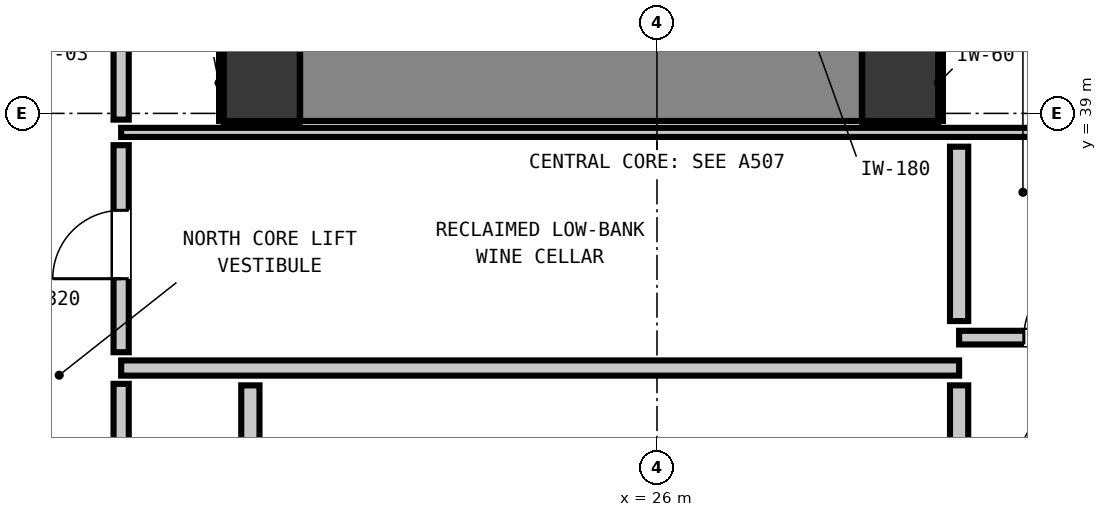
"""IFC4 building model, lengths in metres.
Left out: names, types, materials, properties, quantities, classifications, styles, units other than length and angle.
Written with IfcOpenShell. Run it as: python <this file> out.ifc"""

import sys

from ifc_helpers import new_model, si_unit, direction, frame, frame_2d, origin, origin_2d, place, context, subcontext, project, spatial, rectangle, extrude, element, fill, save


model = new_model("IFC4")
c1 = context("Model", 3, precision=1e-05, world=origin(), true_north=direction((0.0, 1.0)))
c2 = subcontext(c1, "Body", "Model", "MODEL_VIEW")
j1 = project(units=[si_unit("LENGTHUNIT", "METRE"), si_unit("PLANEANGLEUNIT", "RADIAN")], contexts=[c1])
p1 = place(None, origin())
s1 = spatial("IfcSite", under=j1, at=p1, CompositionType="ELEMENT")
p2 = place(p1, origin())
s2 = spatial("IfcBuilding", under=s1, at=p2, CompositionType="ELEMENT")
p3 = place(p2, frame((0.0, 0.0, 135.96)))
s3 = spatial("IfcBuildingStorey", under=s2, at=p3, CompositionType="ELEMENT", Elevation=135.96)
for number, where, z_axis, x_axis in (
    (1, (20.8, 39.4, 0.0), (0.0, 0.0, 1.0), (1.0, 0.0, 0.0)),
    (2, (29.2, 39.4, 0.0), (0.0, 0.0, 1.0), (1.0, 0.0, 0.0)),
):
    element("IfcColumn", number, at=place(p3, frame(where, z_axis=z_axis, x_axis=x_axis)), inside=s3, PredefinedType="COLUMN", context=c2, shape_type="SweptSolid", body=[
        extrude(rectangle(XDim=1.0, YDim=1.0, at=origin_2d()), origin(), (0.0, 0.0, 1.0), 3.32),
    ])
p4 = place(p3, frame((21.305, 39.4, 0.0), z_axis=(0.0, 0.0, 1.0), x_axis=(1.0, 0.0, 0.0)))
e3 = element("IfcWall", 3, at=p4, inside=s3, PredefinedType="SHEAR", context=c2, shape_type="SweptSolid", body=[
    extrude(rectangle(XDim=7.39, YDim=1.0, at=frame_2d((3.695, 0.0))), origin(), (0.0, 0.0, 1.0), 3.32),
])
p5 = place(p3, frame((18.95, 35.65, 0.0), z_axis=(0.0, 0.0, 1.0), x_axis=(1.0, 0.0, 0.0)))
e4 = element("IfcWall", 4, at=p5, inside=s3, PredefinedType="PARTITIONING", context=c2, shape_type="SweptSolid", body=[
    extrude(rectangle(XDim=11.025, YDim=0.2, at=frame_2d((5.513, 0.0))), origin(), (0.0, 0.0, 1.0), 3.08),
])
p6 = place(p3, frame((29.975, 36.05, 0.0), z_axis=(0.0, 0.0, 1.0), x_axis=(1.0, 0.0, 0.0)))
e5 = element("IfcWall", 5, at=p6, inside=s3, PredefinedType="PARTITIONING", context=c2, shape_type="SweptSolid", body=[
    extrude(rectangle(XDim=2.505, YDim=0.18, at=frame_2d((1.252, 0.0))), origin(), (0.0, 0.0, 1.0), 3.08),
])
p7 = place(p6, frame((0.852, 0.0, 0.0)))
e6 = element("IfcOpeningElement", 6, at=p7, cuts=e5, PredefinedType="OPENING", context=c2, shape_type="SweptSolid", body=[
    extrude(rectangle(XDim=0.9, YDim=2.1, at=frame_2d((0.45, 1.05))), frame((0.0, 0.1, 0.0), z_axis=(0.0, -1.0, 0.0), x_axis=(1.0, 0.0, 0.0)), (0.0, 0.0, 1.0), 0.2),
])
p8 = place(p3, frame((18.95, 38.75, 0.0), z_axis=(0.0, 0.0, 1.0), x_axis=(1.0, 0.0, 0.0)))
e7 = element("IfcWall", 7, at=p8, inside=s3, PredefinedType="PARTITIONING", context=c2, shape_type="SweptSolid", body=[
    extrude(rectangle(XDim=13.56, YDim=0.12, at=frame_2d((6.78, 0.0))), origin(), (0.0, 0.0, 1.0), 3.08),
])
p9 = place(p3, frame((20.65, 33.148, 0.0), z_axis=(0.0, 0.0, 1.0), x_axis=(0.0, 1.0, 0.0)))
e8 = element("IfcWall", 8, at=p9, inside=s3, PredefinedType="PARTITIONING", context=c2, shape_type="SweptSolid", body=[
    extrude(rectangle(XDim=2.274, YDim=0.24, at=frame_2d((1.137, 0.0))), origin(), (0.0, 0.0, 1.0), 2.315),
])
p10 = place(p3, frame((29.975, 34.498, 0.0), z_axis=(0.0, 0.0, 1.0), x_axis=(0.0, 1.0, 0.0)))
e9 = element("IfcWall", 9, at=p10, inside=s3, PredefinedType="PARTITIONING", context=c2, shape_type="SweptSolid", body=[
    extrude(rectangle(XDim=0.924, YDim=0.24, at=frame_2d((0.462, 0.0))), origin(), (0.0, 0.0, 1.0), 3.08),
])
p11 = place(p3, frame((29.975, 36.268, 0.0), z_axis=(0.0, 0.0, 1.0), x_axis=(0.0, 1.0, 0.0)))
e10 = element("IfcWall", 10, at=p11, inside=s3, PredefinedType="PARTITIONING", context=c2, shape_type="SweptSolid", body=[
    extrude(rectangle(XDim=2.294, YDim=0.24, at=frame_2d((1.147, 0.0))), origin(), (0.0, 0.0, 1.0), 3.08),
])
p12 = place(p3, frame((18.95, 33.128, 0.0), z_axis=(0.0, 0.0, 1.0), x_axis=(0.0, 1.0, 0.0)))
e11 = element("IfcWall", 11, at=p12, inside=s3, PredefinedType="PARTITIONING", context=c2, shape_type="SweptSolid", body=[
    extrude(rectangle(XDim=2.314, YDim=0.2, at=frame_2d((1.157, 0.0))), origin(), (0.0, 0.0, 1.0), 3.08),
])
p13 = place(p3, frame((18.95, 35.858, 0.0), z_axis=(0.0, 0.0, 1.0), x_axis=(0.0, 1.0, 0.0)))
e12 = element("IfcWall", 12, at=p13, inside=s3, PredefinedType="PARTITIONING", context=c2, shape_type="SweptSolid", body=[
    extrude(rectangle(XDim=2.724, YDim=0.2, at=frame_2d((1.362, 0.0))), origin(), (0.0, 0.0, 1.0), 3.08),
])
p14 = place(p13, frame((0.967, 0.0, 0.0)))
e13 = element("IfcOpeningElement", 13, at=p14, cuts=e12, PredefinedType="OPENING", context=c2, shape_type="SweptSolid", body=[
    extrude(rectangle(XDim=0.9, YDim=2.1, at=frame_2d((0.45, 1.05))), frame((0.0, 0.11, 0.0), z_axis=(0.0, -1.0, 0.0), x_axis=(1.0, 0.0, 0.0)), (0.0, 0.0, 1.0), 0.22),
])
p15 = place(p3, frame((18.95, 38.918, 0.0), z_axis=(0.0, 0.0, 1.0), x_axis=(0.0, 1.0, 0.0)))
e14 = element("IfcWall", 14, at=p15, inside=s3, PredefinedType="PARTITIONING", context=c2, shape_type="SweptSolid", body=[
    extrude(rectangle(XDim=1.134, YDim=0.2, at=frame_2d((0.567, 0.0))), origin(), (0.0, 0.0, 1.0), 3.08),
])
for number, where, z_axis, x_axis in (
    (15, (20.3, 38.868, 0.0), (0.0, 0.0, 1.0), (1.0, 0.0, 0.0)),
    (16, (20.268, 38.9, 0.0), (0.0, 0.0, 1.0), (0.0, 1.0, 0.0)),
    (17, (28.7, 38.868, 0.0), (0.0, 0.0, 1.0), (1.0, 0.0, 0.0)),
    (18, (29.732, 38.9, 0.0), (0.0, 0.0, 1.0), (0.0, 1.0, 0.0)),
):
    element("IfcWall", number, at=place(p3, frame(where, z_axis=z_axis, x_axis=x_axis)), inside=s3, PredefinedType="PARTITIONING", context=c2, shape_type="SweptSolid", body=[
        extrude(rectangle(XDim=1.0, YDim=0.06, at=frame_2d((0.5, 0.0))), origin(), (0.0, 0.0, 1.0), 1.45),
    ])
p16 = place(p7, origin())
e19 = element("IfcDoor", 19, at=p16, inside=s3, OperationType="SINGLE_SWING_RIGHT", PredefinedType="DOOR", context=c2, shape_type="SweptSolid", body=[
    extrude(rectangle(XDim=0.9, YDim=2.1, at=frame_2d((0.45, 1.05))), frame((0.0, 0.025, 0.0), z_axis=(0.0, -1.0, 0.0), x_axis=(1.0, 0.0, 0.0)), (0.0, 0.0, 1.0), 0.05),
])
fill(e6, e19)
p17 = place(p14, origin())
e20 = element("IfcDoor", 20, at=p17, inside=s3, OperationType="SINGLE_SWING_LEFT", PredefinedType="DOOR", context=c2, shape_type="SweptSolid", body=[
    extrude(rectangle(XDim=0.9, YDim=2.1, at=frame_2d((0.45, 1.05))), frame((0.0, 0.025, 0.0), z_axis=(0.0, -1.0, 0.0), x_axis=(1.0, 0.0, 0.0)), (0.0, 0.0, 1.0), 0.05),
])
fill(e13, e20)
save(model, sys.argv[1])
